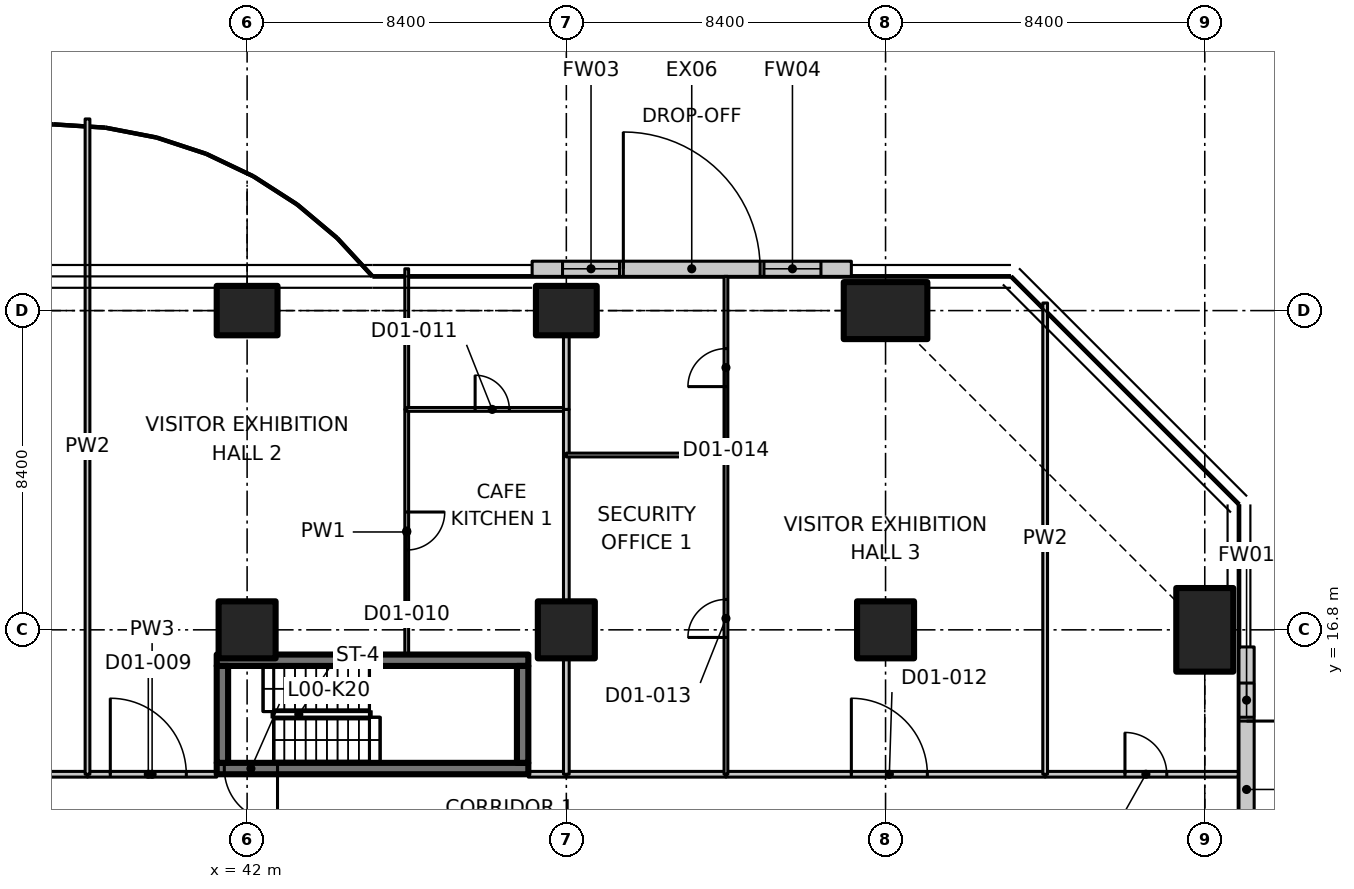
"""IFC4 building model, lengths in metres.
Left out: names, types, materials, properties, quantities, classifications, styles, units other than length and angle.
Written with IfcOpenShell. Run it as: python <this file> out.ifc"""

import sys

from ifc_helpers import new_model, si_unit, direction, frame, frame_2d, origin, origin_2d, place, context, subcontext, project, spatial, polyline, rectangle, outline, extrude, element, fill, save


model = new_model("IFC4")
c1 = context("Model", 3, precision=1e-05, world=origin(), true_north=direction((0.0, 1.0)))
c2 = subcontext(c1, "Body", "Model", "MODEL_VIEW")
j1 = project(units=[si_unit("LENGTHUNIT", "METRE"), si_unit("PLANEANGLEUNIT", "RADIAN")], contexts=[c1])
p1 = place(None, origin())
s1 = spatial("IfcSite", under=j1, at=p1, CompositionType="ELEMENT")
p2 = place(p1, origin())
s2 = spatial("IfcBuilding", under=s1, at=p2, CompositionType="ELEMENT")
p3 = place(p2, origin())
s3 = spatial("IfcBuildingStorey", under=s2, at=p3, CompositionType="ELEMENT", Elevation=0.0)
p4 = place(p3, frame((42.0, 16.8, 0.0), z_axis=(0.0, 0.0, 1.0), x_axis=(1.0, 0.0, 0.0)))
e1 = element("IfcColumn", 1, at=p4, inside=s3, PredefinedType="COLUMN", context=c2, shape_type="SweptSolid", body=[
    extrude(rectangle(XDim=1.5, YDim=1.5, at=origin_2d()), origin(), (0.0, 0.0, 1.0), 6.75),
])
p5 = place(p3, frame((42.0, 25.2, 0.0), z_axis=(0.0, 0.0, 1.0), x_axis=(0.0, 1.0, 0.0)))
e2 = element("IfcColumn", 2, at=p5, inside=s3, PredefinedType="COLUMN", context=c2, shape_type="SweptSolid", body=[
    extrude(rectangle(XDim=1.3, YDim=1.6, at=origin_2d()), origin(), (0.0, 0.0, 1.0), 6.75),
])
p6 = place(p3, frame((50.4, 16.8, 0.0), z_axis=(0.0, 0.0, 1.0), x_axis=(1.0, 0.0, 0.0)))
e3 = element("IfcColumn", 3, at=p6, inside=s3, PredefinedType="COLUMN", context=c2, shape_type="SweptSolid", body=[
    extrude(rectangle(XDim=1.5, YDim=1.5, at=origin_2d()), origin(), (0.0, 0.0, 1.0), 6.75),
])
p7 = place(p3, frame((50.4, 25.2, 0.0), z_axis=(0.0, 0.0, 1.0), x_axis=(0.0, 1.0, 0.0)))
e4 = element("IfcColumn", 4, at=p7, inside=s3, PredefinedType="COLUMN", context=c2, shape_type="SweptSolid", body=[
    extrude(rectangle(XDim=1.3, YDim=1.6, at=origin_2d()), origin(), (0.0, 0.0, 1.0), 6.75),
])
p8 = place(p3, frame((58.8, 16.8, 0.0), z_axis=(0.0, 0.0, 1.0), x_axis=(1.0, 0.0, 0.0)))
e5 = element("IfcColumn", 5, at=p8, inside=s3, PredefinedType="COLUMN", context=c2, shape_type="SweptSolid", body=[
    extrude(rectangle(XDim=1.5, YDim=1.5, at=origin_2d()), origin(), (0.0, 0.0, 1.0), 6.75),
])
for number, where, z_axis, x_axis in (
    (6, (58.8, 25.2, 0.0), (0.0, 0.0, 1.0), (0.0, 1.0, 0.0)),
    (7, (67.2, 16.8, 0.0), (0.0, 0.0, 1.0), (1.0, 0.0, 0.0)),
):
    element("IfcColumn", number, at=place(p3, frame(where, z_axis=z_axis, x_axis=x_axis)), inside=s3, PredefinedType="COLUMN", context=c2, shape_type="SweptSolid", body=[
        extrude(rectangle(XDim=1.5, YDim=2.2, at=origin_2d()), origin(), (0.0, 0.0, 1.0), 6.75),
    ])
p9 = place(p3, frame((68.3, 16.35, 0.0), z_axis=(0.0, 0.0, 1.0), x_axis=(0.0, -1.0, 0.0)))
e8 = element("IfcWall", 8, at=p9, inside=s3, PredefinedType="SOLIDWALL", context=c2, shape_type="SweptSolid", body=[
    extrude(rectangle(XDim=7.5, YDim=0.4, at=frame_2d((3.75, 0.0))), origin(), (0.0, 0.0, 1.0), 6.75),
])
p10 = place(p9, frame((1.95, 0.0, 0.0)))
e9 = element("IfcOpeningElement", 9, at=p10, cuts=e8, PredefinedType="OPENING", context=c2, shape_type="SweptSolid", body=[
    extrude(rectangle(XDim=3.6, YDim=2.8, at=frame_2d((1.8, 1.4))), frame((0.0, 0.21, 0.0), z_axis=(0.0, -1.0, 0.0), x_axis=(1.0, 0.0, 0.0)), (0.0, 0.0, 1.0), 0.42),
])
p11 = place(p9, frame((0.95, 0.0, 0.0)))
e10 = element("IfcOpeningElement", 10, at=p11, cuts=e8, PredefinedType="OPENING", context=c2, shape_type="SweptSolid", body=[
    extrude(rectangle(XDim=0.9, YDim=2.8, at=frame_2d((0.45, 1.4))), frame((0.0, 0.21, 0.0), z_axis=(0.0, -1.0, 0.0), x_axis=(1.0, 0.0, 0.0)), (0.0, 0.0, 1.0), 0.42),
])
p12 = place(p9, frame((5.65, 0.0, 0.0)))
e11 = element("IfcOpeningElement", 11, at=p12, cuts=e8, PredefinedType="OPENING", context=c2, shape_type="SweptSolid", body=[
    extrude(rectangle(XDim=0.9, YDim=2.8, at=frame_2d((0.45, 1.4))), frame((0.0, 0.21, 0.0), z_axis=(0.0, -1.0, 0.0), x_axis=(1.0, 0.0, 0.0)), (0.0, 0.0, 1.0), 0.42),
])
p13 = place(p3, frame((49.5, 26.3, 0.0), z_axis=(0.0, 0.0, 1.0), x_axis=(1.0, 0.0, 0.0)))
e12 = element("IfcWall", 12, at=p13, inside=s3, PredefinedType="SOLIDWALL", context=c2, shape_type="SweptSolid", body=[
    extrude(rectangle(XDim=8.4, YDim=0.4, at=frame_2d((4.2, 0.0))), origin(), (0.0, 0.0, 1.0), 6.75),
])
p14 = place(p13, frame((2.4, 0.0, 0.0)))
e13 = element("IfcOpeningElement", 13, at=p14, cuts=e12, PredefinedType="OPENING", context=c2, shape_type="SweptSolid", body=[
    extrude(rectangle(XDim=3.6, YDim=2.8, at=frame_2d((1.8, 1.4))), frame((0.0, 0.21, 0.0), z_axis=(0.0, -1.0, 0.0), x_axis=(1.0, 0.0, 0.0)), (0.0, 0.0, 1.0), 0.42),
])
p15 = place(p13, frame((0.8, 0.0, 0.0)))
e14 = element("IfcOpeningElement", 14, at=p15, cuts=e12, PredefinedType="OPENING", context=c2, shape_type="SweptSolid", body=[
    extrude(rectangle(XDim=1.5, YDim=2.8, at=frame_2d((0.75, 1.4))), frame((0.0, 0.21, 0.0), z_axis=(0.0, -1.0, 0.0), x_axis=(1.0, 0.0, 0.0)), (0.0, 0.0, 1.0), 0.42),
])
p16 = place(p13, frame((6.1, 0.0, 0.0)))
e15 = element("IfcOpeningElement", 15, at=p16, cuts=e12, PredefinedType="OPENING", context=c2, shape_type="SweptSolid", body=[
    extrude(rectangle(XDim=1.5, YDim=2.8, at=frame_2d((0.75, 1.4))), frame((0.0, 0.21, 0.0), z_axis=(0.0, -1.0, 0.0), x_axis=(1.0, 0.0, 0.0)), (0.0, 0.0, 1.0), 0.42),
])
p17 = place(p3, frame((49.4, 13.15, 0.0), z_axis=(0.0, 0.0, 1.0), x_axis=(-1.0, 0.0, 0.0)))
e16 = element("IfcWall", 16, at=p17, inside=s3, PredefinedType="SHEAR", context=c2, shape_type="SweptSolid", body=[
    extrude(rectangle(XDim=8.2, YDim=0.3, at=frame_2d((4.1, 0.0))), origin(), (0.0, 0.0, 1.0), 6.75),
])
p18 = place(p17, frame((6.6, 0.0, 0.0)))
e17 = element("IfcOpeningElement", 17, at=p18, cuts=e16, PredefinedType="OPENING", context=c2, shape_type="SweptSolid", body=[
    extrude(rectangle(XDim=1.4, YDim=2.1, at=frame_2d((0.7, 1.05))), frame((0.0, 0.16, 0.0), z_axis=(0.0, -1.0, 0.0), x_axis=(1.0, 0.0, 0.0)), (0.0, 0.0, 1.0), 0.32),
])
p19 = place(p3, frame((41.2, 16.0, 0.0), z_axis=(0.0, 0.0, 1.0), x_axis=(1.0, 0.0, 0.0)))
e18 = element("IfcWall", 18, at=p19, inside=s3, PredefinedType="SHEAR", context=c2, shape_type="SweptSolid", body=[
    extrude(rectangle(XDim=8.2, YDim=0.3, at=frame_2d((4.1, 0.0))), origin(), (0.0, 0.0, 1.0), 6.75),
])
for number, where, z_axis, x_axis in (
    (19, (41.35, 13.3, 0.0), (0.0, 0.0, 1.0), (0.0, 1.0, 0.0)),
    (20, (49.25, 13.3, 0.0), (0.0, 0.0, 1.0), (0.0, 1.0, 0.0)),
):
    element("IfcWall", number, at=place(p3, frame(where, z_axis=z_axis, x_axis=x_axis)), inside=s3, PredefinedType="SHEAR", context=c2, shape_type="SweptSolid", body=[
        extrude(rectangle(XDim=2.55, YDim=0.3, at=frame_2d((1.275, 0.0))), origin(), (0.0, 0.0, 1.0), 6.75),
    ])
p20 = place(p3, frame((29.4, 13.0, 0.0), z_axis=(0.0, 0.0, 1.0), x_axis=(1.0, 0.0, 0.0)))
e21 = element("IfcWall", 21, at=p20, inside=s3, PredefinedType="PARTITIONING", context=c2, shape_type="SweptSolid", body=[
    extrude(rectangle(XDim=8.4, YDim=0.15, at=frame_2d((4.2, 0.0))), origin(), (0.0, 0.0, 1.0), 6.73),
])
p21 = place(p20, frame((3.3, 0.0, 0.0)))
e22 = element("IfcOpeningElement", 22, at=p21, cuts=e21, PredefinedType="OPENING", context=c2, shape_type="SweptSolid", body=[
    extrude(rectangle(XDim=1.8, YDim=2.1, at=frame_2d((0.9, 1.05))), frame((0.0, 0.085, 0.0), z_axis=(0.0, -1.0, 0.0), x_axis=(1.0, 0.0, 0.0)), (0.0, 0.0, 1.0), 0.17),
])
p22 = place(p3, frame((37.8, 13.0, 0.0), z_axis=(0.0, 0.0, 1.0), x_axis=(1.0, 0.0, 0.0)))
e23 = element("IfcWall", 23, at=p22, inside=s3, PredefinedType="PARTITIONING", context=c2, shape_type="SweptSolid", body=[
    extrude(rectangle(XDim=3.4, YDim=0.15, at=frame_2d((1.7, 0.0))), origin(), (0.0, 0.0, 1.0), 6.73),
])
p23 = place(p22, frame((0.6, 0.0, 0.0)))
e24 = element("IfcOpeningElement", 24, at=p23, cuts=e23, PredefinedType="OPENING", context=c2, shape_type="SweptSolid", body=[
    extrude(rectangle(XDim=2.0, YDim=2.4, at=frame_2d((1.0, 1.2))), frame((0.0, 0.085, 0.0), z_axis=(0.0, -1.0, 0.0), x_axis=(1.0, 0.0, 0.0)), (0.0, 0.0, 1.0), 0.17),
])
p24 = place(p3, frame((49.4, 13.0, 0.0), z_axis=(0.0, 0.0, 1.0), x_axis=(1.0, 0.0, 0.0)))
e25 = element("IfcWall", 25, at=p24, inside=s3, PredefinedType="PARTITIONING", context=c2, shape_type="SweptSolid", body=[
    extrude(rectangle(XDim=1.0, YDim=0.15, at=frame_2d((0.5, 0.0))), origin(), (0.0, 0.0, 1.0), 6.73),
])
p25 = place(p3, frame((54.6, 13.0, 0.0), z_axis=(0.0, 0.0, 1.0), x_axis=(1.0, 0.0, 0.0)))
e26 = element("IfcWall", 26, at=p25, inside=s3, PredefinedType="PARTITIONING", context=c2, shape_type="SweptSolid", body=[
    extrude(rectangle(XDim=8.4, YDim=0.15, at=frame_2d((4.2, 0.0))), origin(), (0.0, 0.0, 1.0), 6.73),
])
p26 = place(p25, frame((3.3, 0.0, 0.0)))
e27 = element("IfcOpeningElement", 27, at=p26, cuts=e26, PredefinedType="OPENING", context=c2, shape_type="SweptSolid", body=[
    extrude(rectangle(XDim=2.0, YDim=2.4, at=frame_2d((1.0, 1.2))), frame((0.0, 0.085, 0.0), z_axis=(0.0, -1.0, 0.0), x_axis=(1.0, 0.0, 0.0)), (0.0, 0.0, 1.0), 0.17),
])
p27 = place(p3, frame((50.4, 13.0, 0.0), z_axis=(0.0, 0.0, 1.0), x_axis=(1.0, 0.0, 0.0)))
e28 = element("IfcWall", 28, at=p27, inside=s3, PredefinedType="PARTITIONING", context=c2, shape_type="SweptSolid", body=[
    extrude(rectangle(XDim=4.2, YDim=0.15, at=frame_2d((2.1, 0.0))), origin(), (0.0, 0.0, 1.0), 6.73),
])
p28 = place(p3, frame((63.0, 13.0, 0.0), z_axis=(0.0, 0.0, 1.0), x_axis=(1.0, 0.0, 0.0)))
e29 = element("IfcWall", 29, at=p28, inside=s3, PredefinedType="PARTITIONING", context=c2, shape_type="SweptSolid", body=[
    extrude(outline(polyline([(0.0, 0.0), (5.08, 0.0), (5.08, 6.73), (4.65, 6.73), (4.648, 6.38), (3.752, 6.38), (3.75, 6.73), (0.0, 6.73), (0.0, 0.0)])), frame((0.0, 0.075, 0.0), z_axis=(0.0, -1.0, 0.0), x_axis=(1.0, 0.0, 0.0)), (0.0, 0.0, 1.0), 0.15),
])
p29 = place(p28, frame((2.1, 0.0, 0.0)))
e30 = element("IfcOpeningElement", 30, at=p29, cuts=e29, PredefinedType="OPENING", context=c2, shape_type="SweptSolid", body=[
    extrude(rectangle(XDim=1.1, YDim=2.1, at=frame_2d((0.55, 1.05))), frame((0.0, 0.085, 0.0), z_axis=(0.0, -1.0, 0.0), x_axis=(1.0, 0.0, 0.0)), (0.0, 0.0, 1.0), 0.17),
])
p30 = place(p3, frame((37.8, 30.243, 0.0), z_axis=(0.0, 0.0, 1.0), x_axis=(0.0, -1.0, 0.0)))
e31 = element("IfcWall", 31, at=p30, inside=s3, PredefinedType="PARTITIONING", context=c2, shape_type="SweptSolid", body=[
    extrude(outline(polyline([(0.0, 0.0), (17.243, 0.0), (17.243, 6.73), (5.493, 6.73), (5.491, 6.38), (4.595, 6.38), (4.593, 6.73), (0.0, 6.73), (0.0, 0.0)])), frame((0.0, 0.062, 0.0), z_axis=(0.0, -1.0, 0.0), x_axis=(1.0, 0.0, 0.0)), (0.0, 0.0, 1.0), 0.125),
])
p31 = place(p3, frame((46.2, 22.6, 0.0), z_axis=(0.0, 0.0, 1.0), x_axis=(0.0, -1.0, 0.0)))
e32 = element("IfcWall", 32, at=p31, inside=s3, PredefinedType="PARTITIONING", context=c2, shape_type="SweptSolid", body=[
    extrude(rectangle(XDim=6.45, YDim=0.1, at=frame_2d((3.225, 0.0))), origin(), (0.0, 0.0, 1.0), 6.73),
])
p32 = place(p31, frame((2.7, 0.0, 0.0)))
e33 = element("IfcOpeningElement", 33, at=p32, cuts=e32, PredefinedType="OPENING", context=c2, shape_type="SweptSolid", body=[
    extrude(rectangle(XDim=1.0, YDim=2.1, at=frame_2d((0.5, 1.05))), frame((0.0, 0.06, 0.0), z_axis=(0.0, -1.0, 0.0), x_axis=(1.0, 0.0, 0.0)), (0.0, 0.0, 1.0), 0.12),
])
p33 = place(p3, frame((46.2, 26.3, 0.0), z_axis=(0.0, 0.0, 1.0), x_axis=(0.0, -1.0, 0.0)))
e34 = element("IfcWall", 34, at=p33, inside=s3, PredefinedType="PARTITIONING", context=c2, shape_type="SweptSolid", body=[
    extrude(rectangle(XDim=3.7, YDim=0.1, at=frame_2d((1.85, 0.0))), origin(), (0.0, 0.0, 1.0), 6.38),
])
p34 = place(p3, frame((46.2, 22.6, 0.0), z_axis=(0.0, 0.0, 1.0), x_axis=(1.0, 0.0, 0.0)))
e35 = element("IfcWall", 35, at=p34, inside=s3, PredefinedType="PARTITIONING", context=c2, shape_type="SweptSolid", body=[
    extrude(rectangle(XDim=4.2, YDim=0.1, at=frame_2d((2.1, 0.0))), origin(), (0.0, 0.0, 1.0), 6.73),
])
p35 = place(p34, frame((1.8, 0.0, 0.0)))
e36 = element("IfcOpeningElement", 36, at=p35, cuts=e35, PredefinedType="OPENING", context=c2, shape_type="SweptSolid", body=[
    extrude(rectangle(XDim=0.9, YDim=2.1, at=frame_2d((0.45, 1.05))), frame((0.0, 0.06, 0.0), z_axis=(0.0, -1.0, 0.0), x_axis=(1.0, 0.0, 0.0)), (0.0, 0.0, 1.0), 0.12),
])
p36 = place(p3, frame((50.4, 21.4, 0.0), z_axis=(0.0, 0.0, 1.0), x_axis=(0.0, -1.0, 0.0)))
e37 = element("IfcWall", 37, at=p36, inside=s3, PredefinedType="PARTITIONING", context=c2, shape_type="SweptSolid", body=[
    extrude(rectangle(XDim=3.83, YDim=0.15, at=frame_2d((1.915, 0.0))), origin(), (0.0, 0.0, 1.0), 6.73),
])
p37 = place(p3, frame((50.4, 16.03, 0.0), z_axis=(0.0, 0.0, 1.0), x_axis=(0.0, -1.0, 0.0)))
e38 = element("IfcWall", 38, at=p37, inside=s3, PredefinedType="PARTITIONING", context=c2, shape_type="SweptSolid", body=[
    extrude(rectangle(XDim=3.03, YDim=0.15, at=frame_2d((1.515, 0.0))), origin(), (0.0, 0.0, 1.0), 6.73),
])
p38 = place(p3, frame((50.4, 22.6, 0.0), z_axis=(0.0, 0.0, 1.0), x_axis=(0.0, -1.0, 0.0)))
e39 = element("IfcWall", 39, at=p38, inside=s3, PredefinedType="PARTITIONING", context=c2, shape_type="SweptSolid", body=[
    extrude(rectangle(XDim=1.2, YDim=0.15, at=frame_2d((0.6, 0.0))), origin(), (0.0, 0.0, 1.0), 6.73),
])
p39 = place(p3, frame((50.4, 24.53, 0.0), z_axis=(0.0, 0.0, 1.0), x_axis=(0.0, -1.0, 0.0)))
e40 = element("IfcWall", 40, at=p39, inside=s3, PredefinedType="PARTITIONING", context=c2, shape_type="SweptSolid", body=[
    extrude(rectangle(XDim=1.93, YDim=0.15, at=frame_2d((0.965, 0.0))), origin(), (0.0, 0.0, 1.0), 6.73),
])
p40 = place(p3, frame((54.6, 13.0, 0.0), z_axis=(0.0, 0.0, 1.0), x_axis=(0.0, 1.0, 0.0)))
e41 = element("IfcWall", 41, at=p40, inside=s3, PredefinedType="PARTITIONING", context=c2, shape_type="SweptSolid", body=[
    extrude(rectangle(XDim=8.4, YDim=0.1, at=frame_2d((4.2, 0.0))), origin(), (0.0, 0.0, 1.0), 6.73),
])
p41 = place(p40, frame((3.6, 0.0, 0.0)))
e42 = element("IfcOpeningElement", 42, at=p41, cuts=e41, PredefinedType="OPENING", context=c2, shape_type="SweptSolid", body=[
    extrude(rectangle(XDim=1.0, YDim=2.1, at=frame_2d((0.5, 1.05))), frame((0.0, 0.06, 0.0), z_axis=(0.0, -1.0, 0.0), x_axis=(1.0, 0.0, 0.0)), (0.0, 0.0, 1.0), 0.12),
])
p42 = place(p3, frame((54.6, 21.4, 0.0), z_axis=(0.0, 0.0, 1.0), x_axis=(0.0, 1.0, 0.0)))
e43 = element("IfcWall", 43, at=p42, inside=s3, PredefinedType="PARTITIONING", context=c2, shape_type="SweptSolid", body=[
    extrude(outline(polyline([(0.0, 0.0), (4.7, 0.0), (4.7, 6.73), (4.25, 6.73), (4.248, 6.38), (3.352, 6.38), (3.35, 6.73), (0.0, 6.73), (0.0, 0.0)])), frame((0.0, 0.05, 0.0), z_axis=(0.0, -1.0, 0.0), x_axis=(1.0, 0.0, 0.0)), (0.0, 0.0, 1.0), 0.1),
])
p43 = place(p42, frame((1.8, 0.0, 0.0)))
e44 = element("IfcOpeningElement", 44, at=p43, cuts=e43, PredefinedType="OPENING", context=c2, shape_type="SweptSolid", body=[
    extrude(rectangle(XDim=1.0, YDim=2.1, at=frame_2d((0.5, 1.05))), frame((0.0, 0.06, 0.0), z_axis=(0.0, -1.0, 0.0), x_axis=(1.0, 0.0, 0.0)), (0.0, 0.0, 1.0), 0.12),
])
p44 = place(p3, frame((63.0, 25.4, 0.0), z_axis=(0.0, 0.0, 1.0), x_axis=(0.0, -1.0, 0.0)))
e45 = element("IfcWall", 45, at=p44, inside=s3, PredefinedType="PARTITIONING", context=c2, shape_type="SweptSolid", body=[
    extrude(outline(polyline([(0.0, 0.0), (12.4, 0.0), (12.4, 6.73), (5.078, 6.73), (5.076, 6.38), (3.724, 6.38), (3.722, 6.73), (0.0, 6.73), (0.0, 0.0)])), frame((0.0, 0.062, 0.0), z_axis=(0.0, -1.0, 0.0), x_axis=(1.0, 0.0, 0.0)), (0.0, 0.0, 1.0), 0.125),
])
p45 = place(p3, frame((50.4, 21.4, 0.0), z_axis=(0.0, 0.0, 1.0), x_axis=(1.0, 0.0, 0.0)))
e46 = element("IfcWall", 46, at=p45, inside=s3, PredefinedType="PARTITIONING", context=c2, shape_type="SweptSolid", body=[
    extrude(rectangle(XDim=4.2, YDim=0.1, at=frame_2d((2.1, 0.0))), origin(), (0.0, 0.0, 1.0), 6.73),
])
p46 = place(p10, origin())
e47 = element("IfcDoor", 47, at=p46, inside=s3, OperationType="DOUBLE_DOOR_DOUBLE_SWING", PredefinedType="DOOR", context=c2, shape_type="SweptSolid", body=[
    extrude(rectangle(XDim=3.6, YDim=2.8, at=frame_2d((1.8, 1.4))), frame((0.0, 0.025, 0.0), z_axis=(0.0, -1.0, 0.0), x_axis=(1.0, 0.0, 0.0)), (0.0, 0.0, 1.0), 0.05),
])
fill(e9, e47)
p47 = place(p11, origin())
e48 = element("IfcWindow", 48, at=p47, inside=s3, PartitioningType="SINGLE_PANEL", PredefinedType="WINDOW", context=c2, shape_type="SweptSolid", body=[
    extrude(rectangle(XDim=0.9, YDim=2.8, at=frame_2d((0.45, 1.4))), frame((0.0, 0.03, 0.0), z_axis=(0.0, -1.0, 0.0), x_axis=(1.0, 0.0, 0.0)), (0.0, 0.0, 1.0), 0.06),
])
fill(e10, e48)
p48 = place(p14, origin())
e49 = element("IfcDoor", 49, at=p48, inside=s3, OperationType="DOUBLE_DOOR_DOUBLE_SWING", PredefinedType="DOOR", context=c2, shape_type="SweptSolid", body=[
    extrude(rectangle(XDim=3.6, YDim=2.8, at=frame_2d((1.8, 1.4))), frame((0.0, 0.025, 0.0), z_axis=(0.0, -1.0, 0.0), x_axis=(1.0, 0.0, 0.0)), (0.0, 0.0, 1.0), 0.05),
])
fill(e13, e49)
p49 = place(p15, origin())
e50 = element("IfcWindow", 50, at=p49, inside=s3, PartitioningType="SINGLE_PANEL", PredefinedType="WINDOW", context=c2, shape_type="SweptSolid", body=[
    extrude(rectangle(XDim=1.5, YDim=2.8, at=frame_2d((0.75, 1.4))), frame((0.0, 0.03, 0.0), z_axis=(0.0, -1.0, 0.0), x_axis=(1.0, 0.0, 0.0)), (0.0, 0.0, 1.0), 0.06),
])
fill(e14, e50)
p50 = place(p16, origin())
e51 = element("IfcWindow", 51, at=p50, inside=s3, PartitioningType="SINGLE_PANEL", PredefinedType="WINDOW", context=c2, shape_type="SweptSolid", body=[
    extrude(rectangle(XDim=1.5, YDim=2.8, at=frame_2d((0.75, 1.4))), frame((0.0, 0.03, 0.0), z_axis=(0.0, -1.0, 0.0), x_axis=(1.0, 0.0, 0.0)), (0.0, 0.0, 1.0), 0.06),
])
fill(e15, e51)
p51 = place(p18, origin())
e52 = element("IfcDoor", 52, at=p51, inside=s3, OperationType="SINGLE_SWING_LEFT", PredefinedType="DOOR", context=c2, shape_type="SweptSolid", body=[
    extrude(rectangle(XDim=1.4, YDim=2.1, at=frame_2d((0.7, 1.05))), frame((0.0, 0.025, 0.0), z_axis=(0.0, -1.0, 0.0), x_axis=(1.0, 0.0, 0.0)), (0.0, 0.0, 1.0), 0.05),
])
fill(e17, e52)
p52 = place(p23, origin())
e53 = element("IfcDoor", 53, at=p52, inside=s3, OperationType="DOUBLE_DOOR_SINGLE_SWING", PredefinedType="DOOR", context=c2, shape_type="SweptSolid", body=[
    extrude(rectangle(XDim=2.0, YDim=2.4, at=frame_2d((1.0, 1.2))), frame((0.0, 0.025, 0.0), z_axis=(0.0, -1.0, 0.0), x_axis=(1.0, 0.0, 0.0)), (0.0, 0.0, 1.0), 0.05),
])
fill(e24, e53)
p53 = place(p32, origin())
e54 = element("IfcDoor", 54, at=p53, inside=s3, OperationType="SINGLE_SWING_LEFT", PredefinedType="DOOR", context=c2, shape_type="SweptSolid", body=[
    extrude(rectangle(XDim=1.0, YDim=2.1, at=frame_2d((0.5, 1.05))), frame((0.0, 0.025, 0.0), z_axis=(0.0, -1.0, 0.0), x_axis=(1.0, 0.0, 0.0)), (0.0, 0.0, 1.0), 0.05),
])
fill(e33, e54)
p54 = place(p35, origin())
e55 = element("IfcDoor", 55, at=p54, inside=s3, OperationType="SINGLE_SWING_LEFT", PredefinedType="DOOR", context=c2, shape_type="SweptSolid", body=[
    extrude(rectangle(XDim=0.9, YDim=2.1, at=frame_2d((0.45, 1.05))), frame((0.0, 0.025, 0.0), z_axis=(0.0, -1.0, 0.0), x_axis=(1.0, 0.0, 0.0)), (0.0, 0.0, 1.0), 0.05),
])
fill(e36, e55)
p55 = place(p26, origin())
e56 = element("IfcDoor", 56, at=p55, inside=s3, OperationType="DOUBLE_DOOR_SINGLE_SWING", PredefinedType="DOOR", context=c2, shape_type="SweptSolid", body=[
    extrude(rectangle(XDim=2.0, YDim=2.4, at=frame_2d((1.0, 1.2))), frame((0.0, 0.025, 0.0), z_axis=(0.0, -1.0, 0.0), x_axis=(1.0, 0.0, 0.0)), (0.0, 0.0, 1.0), 0.05),
])
fill(e27, e56)
p56 = place(p41, origin())
e57 = element("IfcDoor", 57, at=p56, inside=s3, OperationType="SINGLE_SWING_LEFT", PredefinedType="DOOR", context=c2, shape_type="SweptSolid", body=[
    extrude(rectangle(XDim=1.0, YDim=2.1, at=frame_2d((0.5, 1.05))), frame((0.0, 0.025, 0.0), z_axis=(0.0, -1.0, 0.0), x_axis=(1.0, 0.0, 0.0)), (0.0, 0.0, 1.0), 0.05),
])
fill(e42, e57)
p57 = place(p43, origin())
e58 = element("IfcDoor", 58, at=p57, inside=s3, OperationType="SINGLE_SWING_LEFT", PredefinedType="DOOR", context=c2, shape_type="SweptSolid", body=[
    extrude(rectangle(XDim=1.0, YDim=2.1, at=frame_2d((0.5, 1.05))), frame((0.0, 0.025, 0.0), z_axis=(0.0, -1.0, 0.0), x_axis=(1.0, 0.0, 0.0)), (0.0, 0.0, 1.0), 0.05),
])
fill(e44, e58)
p58 = place(p29, origin())
e59 = element("IfcDoor", 59, at=p58, inside=s3, OperationType="SINGLE_SWING_LEFT", PredefinedType="DOOR", context=c2, shape_type="SweptSolid", body=[
    extrude(rectangle(XDim=1.1, YDim=2.1, at=frame_2d((0.55, 1.05))), frame((0.0, 0.025, 0.0), z_axis=(0.0, -1.0, 0.0), x_axis=(1.0, 0.0, 0.0)), (0.0, 0.0, 1.0), 0.05),
])
fill(e30, e59)
save(model, sys.argv[1])
